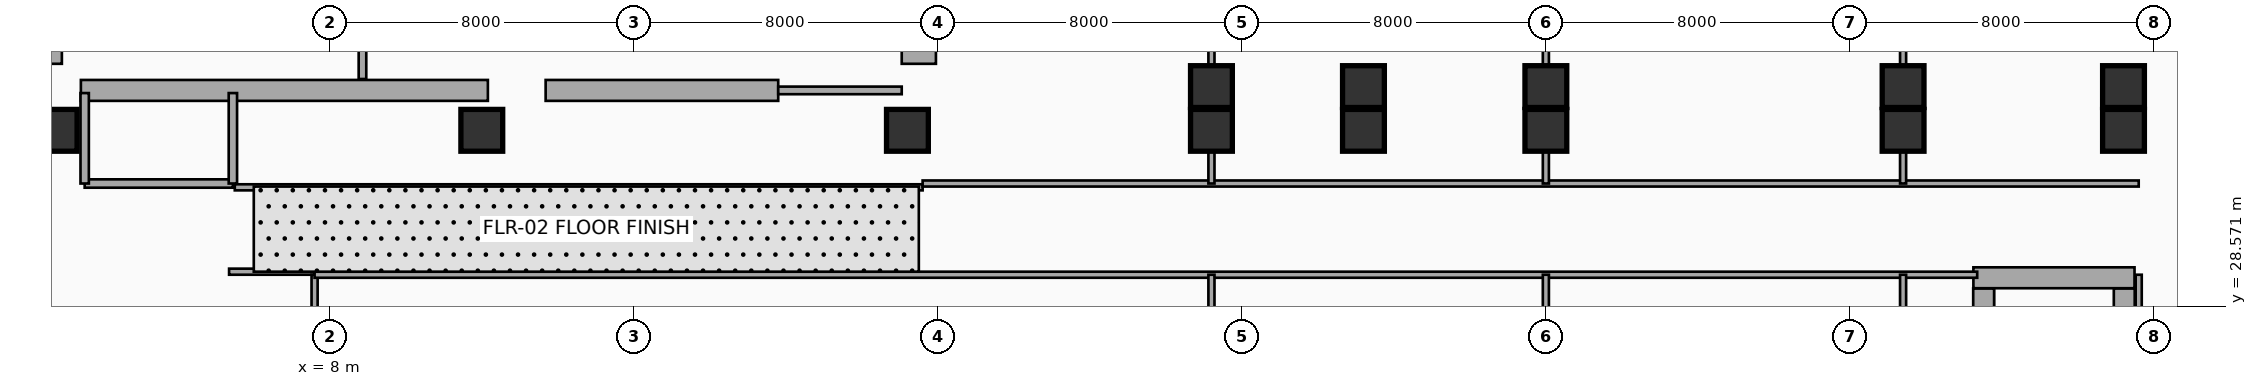
"""IFC4 building model, lengths in metres.
Left out: names, types, materials, properties, quantities, classifications, styles, units other than length and angle.
Written with IfcOpenShell. Run it as: python <this file> out.ifc"""

import sys

from ifc_helpers import new_model, si_unit, direction, frame, frame_2d, origin, origin_2d, place, context, subcontext, project, spatial, rectangle, extrude, element, fill, save


model = new_model("IFC4")
c1 = context("Model", 3, precision=1e-05, world=origin(), true_north=direction((0.0, 1.0)))
c2 = subcontext(c1, "Body", "Model", "MODEL_VIEW")
j1 = project(units=[si_unit("LENGTHUNIT", "METRE"), si_unit("PLANEANGLEUNIT", "RADIAN")], contexts=[c1])
p1 = place(None, origin())
s1 = spatial("IfcSite", under=j1, at=p1, CompositionType="ELEMENT")
p2 = place(p1, origin())
s2 = spatial("IfcBuilding", under=s1, at=p2, CompositionType="ELEMENT")
p3 = place(p2, origin())
s3 = spatial("IfcBuildingStorey", under=s2, at=p3, CompositionType="ELEMENT", Elevation=0.0)
p4 = place(p3, frame((0.5, 34.95, 0.0), z_axis=(0.0, 0.0, 1.0), x_axis=(0.0, 1.0, 0.0)))
e1 = element("IfcWall", 1, at=p4, inside=s3, PredefinedType="SHEAR", context=c2, shape_type="SweptSolid", body=[
    extrude(rectangle(XDim=7.9, YDim=0.9, at=frame_2d((3.95, 0.0))), origin(), (0.0, 0.0, 1.0), 5.94),
])
p5 = place(p3, frame((23.5, 34.95, 0.0), z_axis=(0.0, 0.0, 1.0), x_axis=(0.0, 1.0, 0.0)))
e2 = element("IfcWall", 2, at=p5, inside=s3, PredefinedType="SHEAR", context=c2, shape_type="SweptSolid", body=[
    extrude(rectangle(XDim=10.64, YDim=0.9, at=frame_2d((5.32, 0.0))), origin(), (0.0, 0.0, 1.0), 5.94),
])
p6 = place(p3, frame((1.45, 34.25, 0.0), z_axis=(0.0, 0.0, 1.0), x_axis=(1.0, 0.0, 0.0)))
e3 = element("IfcWall", 3, at=p6, inside=s3, PredefinedType="SHEAR", context=c2, shape_type="SweptSolid", body=[
    extrude(rectangle(XDim=10.71, YDim=0.55, at=frame_2d((5.355, 0.0))), origin(), (0.0, 0.0, 1.0), 5.94),
])
p7 = place(p6, frame((7.25, 0.0, 0.0), z_axis=(0.0, 0.0, 1.0), x_axis=(-1.0, 0.0, 0.0)))
e4 = element("IfcOpeningElement", 4, at=p7, cuts=e3, PredefinedType="OPENING", context=c2, shape_type="SweptSolid", body=[
    extrude(rectangle(XDim=1.1, YDim=2.15, at=frame_2d((0.55, 1.075))), frame((0.0, 0.285, 0.0), z_axis=(0.0, -1.0, 0.0), x_axis=(1.0, 0.0, 0.0)), (0.0, 0.0, 1.0), 0.57),
])
p8 = place(p3, frame((13.68, 34.25, 0.0), z_axis=(0.0, 0.0, 1.0), x_axis=(1.0, 0.0, 0.0)))
e5 = element("IfcWall", 5, at=p8, inside=s3, PredefinedType="SHEAR", context=c2, shape_type="SweptSolid", body=[
    extrude(rectangle(XDim=6.12, YDim=0.55, at=frame_2d((3.06, 0.0))), origin(), (0.0, 0.0, 1.0), 5.94),
])
for number, where, z_axis, x_axis in (
    (6, (51.52, 21.15, 0.0), (0.0, 0.0, 1.0), (0.0, 1.0, 0.0)),
    (7, (55.22, 21.15, 0.0), (0.0, 0.0, 1.0), (0.0, 1.0, 0.0)),
):
    element("IfcWall", number, at=place(p3, frame(where, z_axis=z_axis, x_axis=x_axis)), inside=s3, PredefinedType="SHEAR", context=c2, shape_type="SweptSolid", body=[
        extrude(rectangle(XDim=7.89, YDim=0.55, at=frame_2d((3.945, 0.0))), origin(), (0.0, 0.0, 1.0), 5.94),
    ])
p9 = place(p3, frame((51.25, 29.32, 0.0), z_axis=(0.0, 0.0, 1.0), x_axis=(1.0, 0.0, 0.0)))
e8 = element("IfcWall", 8, at=p9, inside=s3, PredefinedType="SHEAR", context=c2, shape_type="SweptSolid", body=[
    extrude(rectangle(XDim=4.24, YDim=0.55, at=frame_2d((2.12, 0.0))), origin(), (0.0, 0.0, 1.0), 5.94),
])
for number, where, z_axis, x_axis in (
    (9, (0.8, 33.2, 0.0), (0.0, 0.0, 1.0), (1.0, 0.0, 0.0)),
    (10, (12.0, 33.2, 0.0), (0.0, 0.0, 1.0), (1.0, 0.0, 0.0)),
    (11, (23.2, 33.2, 0.0), (0.0, 0.0, 1.0), (1.0, 0.0, 0.0)),
    (12, (31.2, 33.2, 0.0), (0.0, 0.0, 1.0), (1.0, 0.0, 0.0)),
    (13, (31.2, 34.35, 0.0), (0.0, 0.0, 1.0), (1.0, 0.0, 0.0)),
    (14, (35.2, 33.2, 0.0), (0.0, 0.0, 1.0), (1.0, 0.0, 0.0)),
    (15, (35.2, 34.35, 0.0), (0.0, 0.0, 1.0), (1.0, 0.0, 0.0)),
    (16, (40.0, 33.2, 0.0), (0.0, 0.0, 1.0), (1.0, 0.0, 0.0)),
    (17, (40.0, 34.35, 0.0), (0.0, 0.0, 1.0), (1.0, 0.0, 0.0)),
    (18, (49.4, 33.2, 0.0), (0.0, 0.0, 1.0), (1.0, 0.0, 0.0)),
    (19, (49.4, 34.35, 0.0), (0.0, 0.0, 1.0), (1.0, 0.0, 0.0)),
    (20, (55.2, 33.2, 0.0), (0.0, 0.0, 1.0), (1.0, 0.0, 0.0)),
    (21, (55.2, 34.35, 0.0), (0.0, 0.0, 1.0), (1.0, 0.0, 0.0)),
):
    element("IfcColumn", number, at=place(p3, frame(where, z_axis=z_axis, x_axis=x_axis)), inside=s3, PredefinedType="COLUMN", context=c2, shape_type="SweptSolid", body=[
        extrude(rectangle(XDim=1.1, YDim=1.1, at=origin_2d()), origin(), (0.0, 0.0, 1.0), 5.94),
    ])
p10 = place(p3, frame((8.86, 34.55, 0.0), z_axis=(0.0, 0.0, 1.0), x_axis=(0.0, 1.0, 0.0)))
e22 = element("IfcWall", 22, at=p10, inside=s3, PredefinedType="PARTITIONING", context=c2, shape_type="SweptSolid", body=[
    extrude(rectangle(XDim=2.5, YDim=0.2, at=frame_2d((1.25, 0.0))), origin(), (0.0, 0.0, 1.0), 5.62),
])
p11 = place(p3, frame((19.8, 34.25, 0.0), z_axis=(0.0, 0.0, 1.0), x_axis=(1.0, 0.0, 0.0)))
e23 = element("IfcWall", 23, at=p11, inside=s3, PredefinedType="PARTITIONING", context=c2, shape_type="SweptSolid", body=[
    extrude(rectangle(XDim=3.25, YDim=0.2, at=frame_2d((1.625, 0.0))), origin(), (0.0, 0.0, 1.0), 5.62),
])
p12 = place(p11, frame((2.15, 0.0, 0.0), z_axis=(0.0, 0.0, 1.0), x_axis=(-1.0, 0.0, 0.0)))
e24 = element("IfcOpeningElement", 24, at=p12, cuts=e23, PredefinedType="OPENING", context=c2, shape_type="SweptSolid", body=[
    extrude(rectangle(XDim=1.1, YDim=2.15, at=frame_2d((0.55, 1.075))), frame((0.0, 0.11, 0.0), z_axis=(0.0, -1.0, 0.0), x_axis=(1.0, 0.0, 0.0)), (0.0, 0.0, 1.0), 0.22),
])
p13 = place(p3, frame((1.55, 31.8, 0.0), z_axis=(0.0, 0.0, 1.0), x_axis=(1.0, 0.0, 0.0)))
e25 = element("IfcWall", 25, at=p13, inside=s3, PredefinedType="PARTITIONING", context=c2, shape_type="SweptSolid", body=[
    extrude(rectangle(XDim=3.9, YDim=0.22, at=frame_2d((1.95, 0.0))), origin(), (0.0, 0.0, 1.0), 5.62),
])
p14 = place(p13, frame((1.52, 0.0, 0.0), z_axis=(0.0, 0.0, 1.0), x_axis=(-1.0, 0.0, 0.0)))
e26 = element("IfcOpeningElement", 26, at=p14, cuts=e25, PredefinedType="OPENING", context=c2, shape_type="SweptSolid", body=[
    extrude(rectangle(XDim=1.1, YDim=2.2, at=frame_2d((0.55, 1.1))), frame((0.0, 0.12, 0.0), z_axis=(0.0, -1.0, 0.0), x_axis=(1.0, 0.0, 0.0)), (0.0, 0.0, 1.0), 0.24),
])
p15 = place(p13, frame((3.42, 0.0, 0.0), z_axis=(0.0, 0.0, 1.0), x_axis=(-1.0, 0.0, 0.0)))
e27 = element("IfcOpeningElement", 27, at=p15, cuts=e25, PredefinedType="OPENING", context=c2, shape_type="SweptSolid", body=[
    extrude(rectangle(XDim=1.1, YDim=2.2, at=frame_2d((0.55, 1.1))), frame((0.0, 0.12, 0.0), z_axis=(0.0, -1.0, 0.0), x_axis=(1.0, 0.0, 0.0)), (0.0, 0.0, 1.0), 0.24),
])
for number, where, z_axis, x_axis in (
    (28, (1.55, 31.8, 0.0), (0.0, 0.0, 1.0), (0.0, 1.0, 0.0)),
    (29, (5.45, 31.8, 0.0), (0.0, 0.0, 1.0), (0.0, 1.0, 0.0)),
):
    element("IfcWall", number, at=place(p3, frame(where, z_axis=z_axis, x_axis=x_axis)), inside=s3, PredefinedType="PARTITIONING", context=c2, shape_type="SweptSolid", body=[
        extrude(rectangle(XDim=2.38, YDim=0.22, at=frame_2d((1.19, 0.0))), origin(), (0.0, 0.0, 1.0), 5.62),
    ])
p16 = place(p3, frame((5.5, 31.7, 0.0), z_axis=(0.0, 0.0, 1.0), x_axis=(1.0, 0.0, 0.0)))
e30 = element("IfcWall", 30, at=p16, inside=s3, PredefinedType="PARTITIONING", context=c2, shape_type="SweptSolid", body=[
    extrude(rectangle(XDim=18.1, YDim=0.16, at=frame_2d((9.05, 0.0))), origin(), (0.0, 0.0, 1.0), 5.62),
])
p17 = place(p16, frame((0.45, 0.0, 0.0)))
e31 = element("IfcOpeningElement", 31, at=p17, cuts=e30, PredefinedType="OPENING", context=c2, shape_type="SweptSolid", body=[
    extrude(rectangle(XDim=1.1, YDim=2.15, at=frame_2d((0.55, 1.075))), frame((0.0, 0.09, 0.0), z_axis=(0.0, -1.0, 0.0), x_axis=(1.0, 0.0, 0.0)), (0.0, 0.0, 1.0), 0.18),
])
p18 = place(p16, frame((9.5, 0.0, 0.0)))
e32 = element("IfcOpeningElement", 32, at=p18, cuts=e30, PredefinedType="OPENING", context=c2, shape_type="SweptSolid", body=[
    extrude(rectangle(XDim=1.8, YDim=2.3, at=frame_2d((0.9, 1.15))), frame((0.0, 0.09, 0.0), z_axis=(0.0, -1.0, 0.0), x_axis=(1.0, 0.0, 0.0)), (0.0, 0.0, 1.0), 0.18),
])
p19 = place(p3, frame((5.35, 29.48, 0.0), z_axis=(0.0, 0.0, 1.0), x_axis=(1.0, 0.0, 0.0)))
e33 = element("IfcWall", 33, at=p19, inside=s3, PredefinedType="PARTITIONING", context=c2, shape_type="SweptSolid", body=[
    extrude(rectangle(XDim=2.25, YDim=0.16, at=frame_2d((1.125, 0.0))), origin(), (0.0, 0.0, 1.0), 5.275),
])
p20 = place(p19, frame((0.5, 0.0, 0.0)))
e34 = element("IfcOpeningElement", 34, at=p20, cuts=e33, PredefinedType="OPENING", context=c2, shape_type="SweptSolid", body=[
    extrude(rectangle(XDim=1.1, YDim=2.15, at=frame_2d((0.55, 1.075))), frame((0.0, 0.09, 0.0), z_axis=(0.0, -1.0, 0.0), x_axis=(1.0, 0.0, 0.0)), (0.0, 0.0, 1.0), 0.18),
])
p21 = place(p3, frame((7.6, -1.64, 0.0), z_axis=(0.0, 0.0, 1.0), x_axis=(0.0, 1.0, 0.0)))
e35 = element("IfcWall", 35, at=p21, inside=s3, PredefinedType="PARTITIONING", context=c2, shape_type="SweptSolid", body=[
    extrude(rectangle(XDim=31.04, YDim=0.16, at=frame_2d((15.52, 0.0))), origin(), (0.0, 0.0, 1.0), 5.62),
])
p22 = place(p21, frame((1.8, 0.0, 0.0)))
e36 = element("IfcOpeningElement", 36, at=p22, cuts=e35, PredefinedType="OPENING", context=c2, shape_type="SweptSolid", body=[
    extrude(rectangle(XDim=1.1, YDim=2.15, at=frame_2d((0.55, 1.075))), frame((0.0, 0.09, 0.0), z_axis=(0.0, -1.0, 0.0), x_axis=(1.0, 0.0, 0.0)), (0.0, 0.0, 1.0), 0.18),
])
p23 = place(p3, frame((55.6, 16.36, 0.0), z_axis=(0.0, 0.0, 1.0), x_axis=(0.0, 1.0, 0.0)))
e37 = element("IfcWall", 37, at=p23, inside=s3, PredefinedType="PARTITIONING", context=c2, shape_type="SweptSolid", body=[
    extrude(rectangle(XDim=13.04, YDim=0.16, at=frame_2d((6.52, 0.0))), origin(), (0.0, 0.0, 1.0), 4.805),
])
p24 = place(p3, frame((7.6, 29.4, 0.0), z_axis=(0.0, 0.0, 1.0), x_axis=(1.0, 0.0, 0.0)))
e38 = element("IfcWall", 38, at=p24, inside=s3, PredefinedType="PARTITIONING", context=c2, shape_type="SweptSolid", body=[
    extrude(rectangle(XDim=43.75, YDim=0.16, at=frame_2d((21.875, 0.0))), origin(), (0.0, 0.0, 1.0), 5.275),
])
p25 = place(p24, frame((3.5, 0.0, 0.0)))
e39 = element("IfcOpeningElement", 39, at=p25, cuts=e38, PredefinedType="OPENING", context=c2, shape_type="SweptSolid", body=[
    extrude(rectangle(XDim=1.8, YDim=2.3, at=frame_2d((0.9, 1.15))), frame((0.0, 0.09, 0.0), z_axis=(0.0, -1.0, 0.0), x_axis=(1.0, 0.0, 0.0)), (0.0, 0.0, 1.0), 0.18),
])
p26 = place(p24, frame((18.0, 0.0, 0.0)))
e40 = element("IfcOpeningElement", 40, at=p26, cuts=e38, PredefinedType="OPENING", context=c2, shape_type="SweptSolid", body=[
    extrude(rectangle(XDim=1.8, YDim=2.3, at=frame_2d((0.9, 1.15))), frame((0.0, 0.09, 0.0), z_axis=(0.0, -1.0, 0.0), x_axis=(1.0, 0.0, 0.0)), (0.0, 0.0, 1.0), 0.18),
])
p27 = place(p24, frame((29.5, 0.0, 0.0)))
e41 = element("IfcOpeningElement", 41, at=p27, cuts=e38, PredefinedType="OPENING", context=c2, shape_type="SweptSolid", body=[
    extrude(rectangle(XDim=0.95, YDim=2.15, at=frame_2d((0.475, 1.075))), frame((0.0, 0.09, 0.0), z_axis=(0.0, -1.0, 0.0), x_axis=(1.0, 0.0, 0.0)), (0.0, 0.0, 1.0), 0.18),
])
p28 = place(p24, frame((35.5, 0.0, 0.0)))
e42 = element("IfcOpeningElement", 42, at=p28, cuts=e38, PredefinedType="OPENING", context=c2, shape_type="SweptSolid", body=[
    extrude(rectangle(XDim=1.8, YDim=2.3, at=frame_2d((0.9, 1.15))), frame((0.0, 0.09, 0.0), z_axis=(0.0, -1.0, 0.0), x_axis=(1.0, 0.0, 0.0)), (0.0, 0.0, 1.0), 0.18),
])
p29 = place(p3, frame((31.2, -1.64, 0.0), z_axis=(0.0, 0.0, 1.0), x_axis=(0.0, 1.0, 0.0)))
e43 = element("IfcWall", 43, at=p29, inside=s3, PredefinedType="PARTITIONING", context=c2, shape_type="SweptSolid", body=[
    extrude(rectangle(XDim=31.04, YDim=0.16, at=frame_2d((15.52, 0.0))), origin(), (0.0, 0.0, 1.0), 4.805),
])
for number, where, z_axis, x_axis in (
    (44, (40.0, 16.36, 0.0), (0.0, 0.0, 1.0), (0.0, 1.0, 0.0)),
    (45, (49.4, 16.36, 0.0), (0.0, 0.0, 1.0), (0.0, 1.0, 0.0)),
):
    element("IfcWall", number, at=place(p3, frame(where, z_axis=z_axis, x_axis=x_axis)), inside=s3, PredefinedType="PARTITIONING", context=c2, shape_type="SweptSolid", body=[
        extrude(rectangle(XDim=13.04, YDim=0.16, at=frame_2d((6.52, 0.0))), origin(), (0.0, 0.0, 1.0), 4.805),
    ])
p30 = place(p3, frame((23.6, 31.8, 0.0), z_axis=(0.0, 0.0, 1.0), x_axis=(1.0, 0.0, 0.0)))
e46 = element("IfcWall", 46, at=p30, inside=s3, PredefinedType="PARTITIONING", context=c2, shape_type="SweptSolid", body=[
    extrude(rectangle(XDim=32.0, YDim=0.16, at=frame_2d((16.0, 0.0))), origin(), (0.0, 0.0, 1.0), 5.62),
])
p31 = place(p30, frame((3.0, 0.0, 0.0)))
e47 = element("IfcOpeningElement", 47, at=p31, cuts=e46, PredefinedType="OPENING", context=c2, shape_type="SweptSolid", body=[
    extrude(rectangle(XDim=1.8, YDim=2.3, at=frame_2d((0.9, 1.15))), frame((0.0, 0.09, 0.0), z_axis=(0.0, -1.0, 0.0), x_axis=(1.0, 0.0, 0.0)), (0.0, 0.0, 1.0), 0.18),
])
p32 = place(p30, frame((9.5, 0.0, 0.0)))
e48 = element("IfcOpeningElement", 48, at=p32, cuts=e46, PredefinedType="OPENING", context=c2, shape_type="SweptSolid", body=[
    extrude(rectangle(XDim=0.95, YDim=2.15, at=frame_2d((0.475, 1.075))), frame((0.0, 0.09, 0.0), z_axis=(0.0, -1.0, 0.0), x_axis=(1.0, 0.0, 0.0)), (0.0, 0.0, 1.0), 0.18),
])
p33 = place(p30, frame((20.0, 0.0, 0.0)))
e49 = element("IfcOpeningElement", 49, at=p33, cuts=e46, PredefinedType="OPENING", context=c2, shape_type="SweptSolid", body=[
    extrude(rectangle(XDim=1.8, YDim=2.3, at=frame_2d((0.9, 1.15))), frame((0.0, 0.09, 0.0), z_axis=(0.0, -1.0, 0.0), x_axis=(1.0, 0.0, 0.0)), (0.0, 0.0, 1.0), 0.18),
])
for number, where, z_axis, x_axis in (
    (50, (31.2, 31.8, 0.0), (0.0, 0.0, 1.0), (0.0, 1.0, 0.0)),
    (51, (40.0, 31.8, 0.0), (0.0, 0.0, 1.0), (0.0, 1.0, 0.0)),
    (52, (49.4, 31.8, 0.0), (0.0, 0.0, 1.0), (0.0, 1.0, 0.0)),
):
    element("IfcWall", number, at=place(p3, frame(where, z_axis=z_axis, x_axis=x_axis)), inside=s3, PredefinedType="PARTITIONING", context=c2, shape_type="SweptSolid", body=[
        extrude(rectangle(XDim=15.84, YDim=0.16, at=frame_2d((7.92, 0.0))), origin(), (0.0, 0.0, 1.0), 4.805),
    ])
p34 = place(p7, origin())
e53 = element("IfcDoor", 53, at=p34, inside=s3, OperationType="SINGLE_SWING_LEFT", PredefinedType="DOOR", context=c2, shape_type="SweptSolid", body=[
    extrude(rectangle(XDim=1.1, YDim=2.15, at=frame_2d((0.55, 1.075))), frame((0.0, 0.025, 0.0), z_axis=(0.0, -1.0, 0.0), x_axis=(1.0, 0.0, 0.0)), (0.0, 0.0, 1.0), 0.05),
])
fill(e4, e53)
p35 = place(p12, origin())
e54 = element("IfcDoor", 54, at=p35, inside=s3, OperationType="SINGLE_SWING_LEFT", PredefinedType="DOOR", context=c2, shape_type="SweptSolid", body=[
    extrude(rectangle(XDim=1.1, YDim=2.15, at=frame_2d((0.55, 1.075))), frame((0.0, 0.025, 0.0), z_axis=(0.0, -1.0, 0.0), x_axis=(1.0, 0.0, 0.0)), (0.0, 0.0, 1.0), 0.05),
])
fill(e24, e54)
p36 = place(p14, origin())
e55 = element("IfcDoor", 55, at=p36, inside=s3, OperationType="SLIDING_TO_LEFT", PredefinedType="DOOR", context=c2, shape_type="SweptSolid", body=[
    extrude(rectangle(XDim=1.1, YDim=2.2, at=frame_2d((0.55, 1.1))), frame((0.0, 0.025, 0.0), z_axis=(0.0, -1.0, 0.0), x_axis=(1.0, 0.0, 0.0)), (0.0, 0.0, 1.0), 0.05),
])
fill(e26, e55)
p37 = place(p15, origin())
e56 = element("IfcDoor", 56, at=p37, inside=s3, OperationType="SLIDING_TO_LEFT", PredefinedType="DOOR", context=c2, shape_type="SweptSolid", body=[
    extrude(rectangle(XDim=1.1, YDim=2.2, at=frame_2d((0.55, 1.1))), frame((0.0, 0.025, 0.0), z_axis=(0.0, -1.0, 0.0), x_axis=(1.0, 0.0, 0.0)), (0.0, 0.0, 1.0), 0.05),
])
fill(e27, e56)
p38 = place(p17, origin())
e57 = element("IfcDoor", 57, at=p38, inside=s3, OperationType="SINGLE_SWING_RIGHT", PredefinedType="DOOR", context=c2, shape_type="SweptSolid", body=[
    extrude(rectangle(XDim=1.1, YDim=2.15, at=frame_2d((0.55, 1.075))), frame((0.0, 0.025, 0.0), z_axis=(0.0, -1.0, 0.0), x_axis=(1.0, 0.0, 0.0)), (0.0, 0.0, 1.0), 0.05),
])
fill(e31, e57)
p39 = place(p18, origin())
e58 = element("IfcDoor", 58, at=p39, inside=s3, OperationType="SINGLE_SWING_LEFT", PredefinedType="DOOR", context=c2, shape_type="SweptSolid", body=[
    extrude(rectangle(XDim=1.8, YDim=2.3, at=frame_2d((0.9, 1.15))), frame((0.0, 0.025, 0.0), z_axis=(0.0, -1.0, 0.0), x_axis=(1.0, 0.0, 0.0)), (0.0, 0.0, 1.0), 0.05),
])
fill(e32, e58)
p40 = place(p20, origin())
e59 = element("IfcDoor", 59, at=p40, inside=s3, OperationType="SINGLE_SWING_RIGHT", PredefinedType="DOOR", context=c2, shape_type="SweptSolid", body=[
    extrude(rectangle(XDim=1.1, YDim=2.15, at=frame_2d((0.55, 1.075))), frame((0.0, 0.025, 0.0), z_axis=(0.0, -1.0, 0.0), x_axis=(1.0, 0.0, 0.0)), (0.0, 0.0, 1.0), 0.05),
])
fill(e34, e59)
p41 = place(p25, origin())
e60 = element("IfcDoor", 60, at=p41, inside=s3, OperationType="SINGLE_SWING_LEFT", PredefinedType="DOOR", context=c2, shape_type="SweptSolid", body=[
    extrude(rectangle(XDim=1.8, YDim=2.3, at=frame_2d((0.9, 1.15))), frame((0.0, 0.025, 0.0), z_axis=(0.0, -1.0, 0.0), x_axis=(1.0, 0.0, 0.0)), (0.0, 0.0, 1.0), 0.05),
])
fill(e39, e60)
p42 = place(p26, origin())
e61 = element("IfcDoor", 61, at=p42, inside=s3, OperationType="SINGLE_SWING_RIGHT", PredefinedType="DOOR", context=c2, shape_type="SweptSolid", body=[
    extrude(rectangle(XDim=1.8, YDim=2.3, at=frame_2d((0.9, 1.15))), frame((0.0, 0.025, 0.0), z_axis=(0.0, -1.0, 0.0), x_axis=(1.0, 0.0, 0.0)), (0.0, 0.0, 1.0), 0.05),
])
fill(e40, e61)
p43 = place(p27, origin())
e62 = element("IfcDoor", 62, at=p43, inside=s3, OperationType="SINGLE_SWING_LEFT", PredefinedType="DOOR", context=c2, shape_type="SweptSolid", body=[
    extrude(rectangle(XDim=0.95, YDim=2.15, at=frame_2d((0.475, 1.075))), frame((0.0, 0.025, 0.0), z_axis=(0.0, -1.0, 0.0), x_axis=(1.0, 0.0, 0.0)), (0.0, 0.0, 1.0), 0.05),
])
fill(e41, e62)
p44 = place(p28, origin())
e63 = element("IfcDoor", 63, at=p44, inside=s3, OperationType="SINGLE_SWING_RIGHT", PredefinedType="DOOR", context=c2, shape_type="SweptSolid", body=[
    extrude(rectangle(XDim=1.8, YDim=2.3, at=frame_2d((0.9, 1.15))), frame((0.0, 0.025, 0.0), z_axis=(0.0, -1.0, 0.0), x_axis=(1.0, 0.0, 0.0)), (0.0, 0.0, 1.0), 0.05),
])
fill(e42, e63)
p45 = place(p31, origin())
e64 = element("IfcDoor", 64, at=p45, inside=s3, OperationType="SINGLE_SWING_LEFT", PredefinedType="DOOR", context=c2, shape_type="SweptSolid", body=[
    extrude(rectangle(XDim=1.8, YDim=2.3, at=frame_2d((0.9, 1.15))), frame((0.0, 0.025, 0.0), z_axis=(0.0, -1.0, 0.0), x_axis=(1.0, 0.0, 0.0)), (0.0, 0.0, 1.0), 0.05),
])
fill(e47, e64)
p46 = place(p32, origin())
e65 = element("IfcDoor", 65, at=p46, inside=s3, OperationType="SINGLE_SWING_RIGHT", PredefinedType="DOOR", context=c2, shape_type="SweptSolid", body=[
    extrude(rectangle(XDim=0.95, YDim=2.15, at=frame_2d((0.475, 1.075))), frame((0.0, 0.025, 0.0), z_axis=(0.0, -1.0, 0.0), x_axis=(1.0, 0.0, 0.0)), (0.0, 0.0, 1.0), 0.05),
])
fill(e48, e65)
p47 = place(p33, origin())
e66 = element("IfcDoor", 66, at=p47, inside=s3, OperationType="SINGLE_SWING_LEFT", PredefinedType="DOOR", context=c2, shape_type="SweptSolid", body=[
    extrude(rectangle(XDim=1.8, YDim=2.3, at=frame_2d((0.9, 1.15))), frame((0.0, 0.025, 0.0), z_axis=(0.0, -1.0, 0.0), x_axis=(1.0, 0.0, 0.0)), (0.0, 0.0, 1.0), 0.05),
])
fill(e49, e66)
save(model, sys.argv[1])
